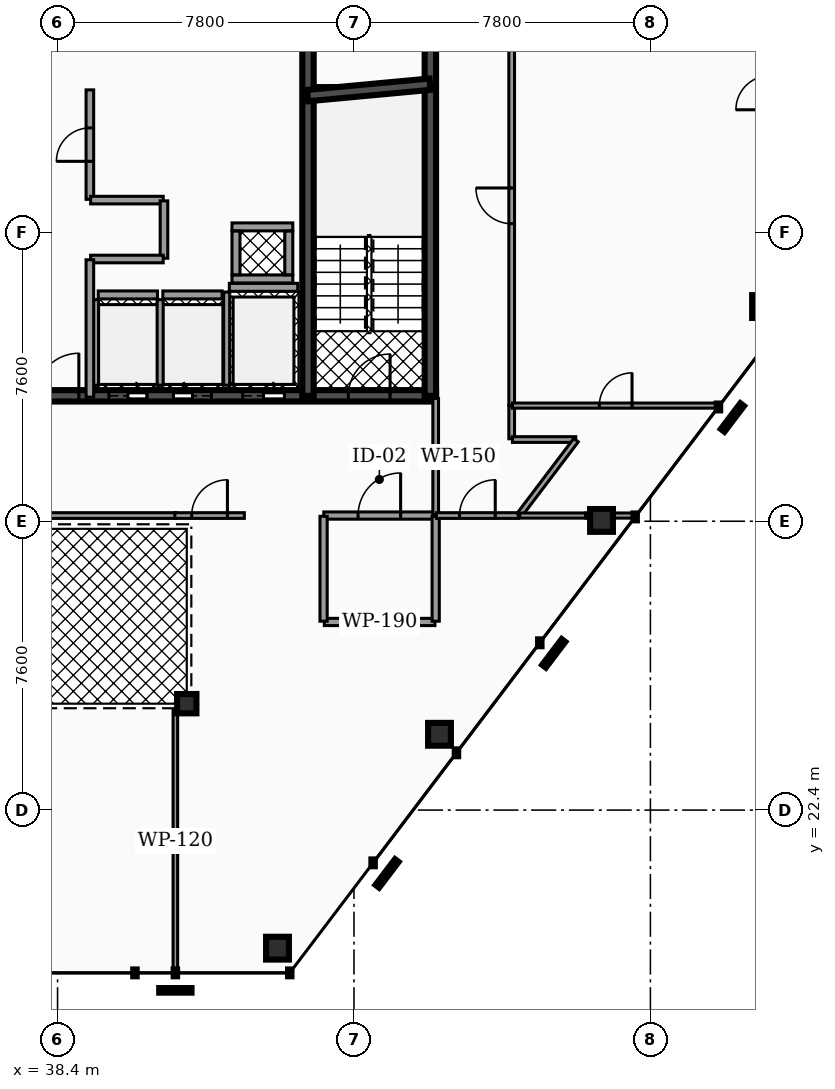
"""IFC4 building model, lengths in metres.
Left out: names, types, materials, properties, quantities, classifications, styles, units other than length and angle.
Written with IfcOpenShell. Run it as: python <this file> out.ifc"""

import sys

from ifc_helpers import new_model, si_unit, direction, frame, frame_2d, origin, origin_2d, place, context, subcontext, project, spatial, rectangle, hollow_rectangle, hollow_circle, extrude, element, fill, save


model = new_model("IFC4")
c1 = context("Model", 3, precision=1e-05, world=origin(), true_north=direction((0.0, 1.0)))
c2 = subcontext(c1, "Body", "Model", "MODEL_VIEW")
j1 = project(units=[si_unit("LENGTHUNIT", "METRE"), si_unit("PLANEANGLEUNIT", "RADIAN")], contexts=[c1])
p1 = place(None, origin())
s1 = spatial("IfcSite", under=j1, at=p1, CompositionType="ELEMENT")
p2 = place(p1, origin())
s2 = spatial("IfcBuilding", under=s1, at=p2, CompositionType="ELEMENT")
p3 = place(p2, frame((0.0, 0.0, 218.96)))
s3 = spatial("IfcBuildingStorey", under=s2, at=p3, CompositionType="ELEMENT", Elevation=218.96)
p4 = place(p3, frame((28.5, 33.3, 0.0), z_axis=(0.0, 0.0, 1.0), x_axis=(1.0, 0.0, 0.0)))
e1 = element("IfcWall", 1, at=p4, inside=s3, PredefinedType="SHEAR", context=c2, shape_type="SweptSolid", body=[
    extrude(rectangle(XDim=19.86, YDim=0.3, at=frame_2d((9.93, 0.0))), origin(), (0.0, 0.0, 1.0), 3.18),
])
p5 = place(p4, frame((3.93, 0.0, 0.0)))
e2 = element("IfcOpeningElement", 2, at=p5, cuts=e1, PredefinedType="OPENING", context=c2, shape_type="SweptSolid", body=[
    extrude(rectangle(XDim=1.1, YDim=2.15, at=frame_2d((0.55, 1.075))), frame((0.0, 0.16, 0.0), z_axis=(0.0, -1.0, 0.0), x_axis=(1.0, 0.0, 0.0)), (0.0, 0.0, 1.0), 0.32),
])
p6 = place(p4, frame((14.77, 0.0, 0.0)))
e3 = element("IfcOpeningElement", 3, at=p6, cuts=e1, PredefinedType="OPENING", context=c2, shape_type="SweptSolid", body=[
    extrude(rectangle(XDim=1.1, YDim=2.15, at=frame_2d((0.55, 1.075))), frame((0.0, 0.16, 0.0), z_axis=(0.0, -1.0, 0.0), x_axis=(1.0, 0.0, 0.0)), (0.0, 0.0, 1.0), 0.32),
])
p7 = place(p4, frame((11.25, 0.0, 0.0)))
e4 = element("IfcOpeningElement", 4, at=p7, cuts=e1, PredefinedType="OPENING", context=c2, shape_type="SweptSolid", body=[
    extrude(rectangle(XDim=1.0, YDim=2.1, at=frame_2d((0.5, 1.05))), frame((0.0, 0.16, 0.0), z_axis=(0.0, -1.0, 0.0), x_axis=(1.0, 0.0, 0.0)), (0.0, 0.0, 1.0), 0.32),
])
p8 = place(p4, frame((12.95, 0.0, 0.0)))
e5 = element("IfcOpeningElement", 5, at=p8, cuts=e1, PredefinedType="OPENING", context=c2, shape_type="SweptSolid", body=[
    extrude(rectangle(XDim=1.0, YDim=2.1, at=frame_2d((0.5, 1.05))), frame((0.0, 0.16, 0.0), z_axis=(0.0, -1.0, 0.0), x_axis=(1.0, 0.0, 0.0)), (0.0, 0.0, 1.0), 0.32),
])
p9 = place(p4, frame((5.85, 0.0, 0.0)))
e6 = element("IfcOpeningElement", 6, at=p9, cuts=e1, PredefinedType="OPENING", context=c2, shape_type="SweptSolid", body=[
    extrude(rectangle(XDim=1.0, YDim=2.1, at=frame_2d((0.5, 1.05))), frame((0.0, 0.16, 0.0), z_axis=(0.0, -1.0, 0.0), x_axis=(1.0, 0.0, 0.0)), (0.0, 0.0, 1.0), 0.32),
])
p10 = place(p4, frame((1.21, 0.0, 0.0)))
e7 = element("IfcOpeningElement", 7, at=p10, cuts=e1, PredefinedType="OPENING", context=c2, shape_type="SweptSolid", body=[
    extrude(rectangle(XDim=1.1, YDim=2.2, at=frame_2d((0.55, 1.1))), frame((0.0, 0.16, 0.0), z_axis=(0.0, -1.0, 0.0), x_axis=(1.0, 0.0, 0.0)), (0.0, 0.0, 1.0), 0.32),
])
p11 = place(p4, frame((9.34, 0.0, 0.0)))
e8 = element("IfcOpeningElement", 8, at=p11, cuts=e1, PredefinedType="OPENING", context=c2, shape_type="SweptSolid", body=[
    extrude(rectangle(XDim=1.12, YDim=2.05, at=frame_2d((0.56, 1.025))), frame((0.0, 0.16, 0.0), z_axis=(0.0, -1.0, 0.0), x_axis=(1.0, 0.0, 0.0)), (0.0, 0.0, 1.0), 0.32),
])
p12 = place(p4, frame((17.55, 0.0, 0.0)))
e9 = element("IfcOpeningElement", 9, at=p12, cuts=e1, PredefinedType="OPENING", context=c2, shape_type="SweptSolid", body=[
    extrude(rectangle(XDim=1.1, YDim=2.2, at=frame_2d((0.55, 1.1))), frame((0.0, 0.16, 0.0), z_axis=(0.0, -1.0, 0.0), x_axis=(1.0, 0.0, 0.0)), (0.0, 0.0, 1.0), 0.32),
])
for number, where, z_axis, x_axis in (
    (10, (44.99, 33.3, 0.0), (0.0, 0.0, 1.0), (0.0, 1.0, 0.0)),
    (11, (48.21, 33.3, 0.0), (0.0, 0.0, 1.0), (0.0, 1.0, 0.0)),
):
    element("IfcWall", number, at=place(p3, frame(where, z_axis=z_axis, x_axis=x_axis)), inside=s3, PredefinedType="SHEAR", context=c2, shape_type="SweptSolid", body=[
        extrude(rectangle(XDim=10.1, YDim=0.3, at=frame_2d((5.05, 0.0))), origin(), (0.0, 0.0, 1.0), 3.18),
    ])
p13 = place(p3, frame((44.98, 41.2, 0.0), z_axis=(0.0, 0.0, 1.0), x_axis=(0.995686468965, 0.09278176286, 0.0)))
e12 = element("IfcWall", 12, at=p13, inside=s3, PredefinedType="SHEAR", context=c2, shape_type="SweptSolid", body=[
    extrude(rectangle(XDim=3.234, YDim=0.3, at=frame_2d((1.617, 0.0))), origin(), (0.0, 0.0, 1.0), 3.18),
])
for number, where, z_axis, x_axis in (
    (13, (44.187, 18.767, 0.0), (0.0, 0.0, 1.0), (1.0, 0.0, 0.0)),
    (14, (48.45, 24.394, 0.0), (0.0, 0.0, 1.0), (1.0, 0.0, 0.0)),
    (15, (52.714, 30.022, 0.0), (0.0, 0.0, 1.0), (1.0, 0.0, 0.0)),
    (16, (56.977, 35.649, 0.0), (0.0, 0.0, 1.0), (1.0, 0.0, 0.0)),
):
    element("IfcColumn", number, at=place(p3, frame(where, z_axis=z_axis, x_axis=x_axis)), inside=s3, PredefinedType="COLUMN", context=c2, shape_type="SweptSolid", body=[
        extrude(hollow_rectangle(XDim=0.6, YDim=0.6, WallThickness=0.03, at=origin_2d()), origin(), (0.0, 0.0, 1.0), 3.18),
    ])
p14 = place(p3, frame((41.8, 25.2, 0.0), z_axis=(0.0, 0.0, 1.0), x_axis=(1.0, 0.0, 0.0)))
e17 = element("IfcColumn", 17, at=p14, inside=s3, PredefinedType="COLUMN", context=c2, shape_type="SweptSolid", body=[
    extrude(hollow_circle(Radius=0.254, WallThickness=0.02, at=origin_2d()), origin(), (0.0, 0.0, 1.0), 3.18),
])
p15 = place(p3, frame((42.92, 36.155, 0.0), z_axis=(0.0, 0.0, 1.0), x_axis=(1.0, 0.0, 0.0)))
e18 = element("IfcWall", 18, at=p15, inside=s3, PredefinedType="SOLIDWALL", context=c2, shape_type="SweptSolid", body=[
    extrude(rectangle(XDim=1.8, YDim=0.21, at=frame_2d((0.9, 0.0))), origin(), (0.0, 0.0, 1.0), 3.18),
])
p16 = place(p3, frame((42.85, 33.58, 0.0), z_axis=(0.0, 0.0, 1.0), x_axis=(0.0, 1.0, 0.0)))
e19 = element("IfcWall", 19, at=p16, inside=s3, PredefinedType="SOLIDWALL", context=c2, shape_type="SweptSolid", body=[
    extrude(rectangle(XDim=2.45, YDim=0.16, at=frame_2d((1.225, 0.0))), origin(), (0.0, 0.0, 1.0), 3.18),
])
p17 = place(p3, frame((39.47, 35.955, 0.0), z_axis=(0.0, 0.0, 1.0), x_axis=(1.0, 0.0, 0.0)))
e20 = element("IfcWall", 20, at=p17, inside=s3, PredefinedType="SOLIDWALL", context=c2, shape_type="SweptSolid", body=[
    extrude(rectangle(XDim=1.56, YDim=0.21, at=frame_2d((0.78, 0.0))), origin(), (0.0, 0.0, 1.0), 3.18),
])
for number, where, z_axis, x_axis in (
    (21, (39.4, 33.58, 0.0), (0.0, 0.0, 1.0), (0.0, 1.0, 0.0)),
    (22, (41.1, 33.58, 0.0), (0.0, 0.0, 1.0), (0.0, 1.0, 0.0)),
):
    element("IfcWall", number, at=place(p3, frame(where, z_axis=z_axis, x_axis=x_axis)), inside=s3, PredefinedType="SOLIDWALL", context=c2, shape_type="SweptSolid", body=[
        extrude(rectangle(XDim=2.25, YDim=0.16, at=frame_2d((1.125, 0.0))), origin(), (0.0, 0.0, 1.0), 3.18),
    ])
p18 = place(p3, frame((41.17, 35.955, 0.0), z_axis=(0.0, 0.0, 1.0), x_axis=(1.0, 0.0, 0.0)))
e23 = element("IfcWall", 23, at=p18, inside=s3, PredefinedType="SOLIDWALL", context=c2, shape_type="SweptSolid", body=[
    extrude(rectangle(XDim=1.56, YDim=0.21, at=frame_2d((0.78, 0.0))), origin(), (0.0, 0.0, 1.0), 3.18),
])
for number, where, z_axis, x_axis in (
    (24, (42.99, 36.375, 0.0), (0.0, 0.0, 1.0), (1.0, 0.0, 0.0)),
    (25, (42.99, 37.745, 0.0), (0.0, 0.0, 1.0), (1.0, 0.0, 0.0)),
):
    element("IfcWall", number, at=place(p3, frame(where, z_axis=z_axis, x_axis=x_axis)), inside=s3, PredefinedType="SOLIDWALL", context=c2, shape_type="SweptSolid", body=[
        extrude(rectangle(XDim=1.6, YDim=0.21, at=frame_2d((0.8, 0.0))), origin(), (0.0, 0.0, 1.0), 3.18),
    ])
for number, where, z_axis, x_axis in (
    (26, (43.095, 36.485, 0.0), (0.0, 0.0, 1.0), (0.0, 1.0, 0.0)),
    (27, (44.485, 36.485, 0.0), (0.0, 0.0, 1.0), (0.0, 1.0, 0.0)),
):
    element("IfcWall", number, at=place(p3, frame(where, z_axis=z_axis, x_axis=x_axis)), inside=s3, PredefinedType="SOLIDWALL", context=c2, shape_type="SweptSolid", body=[
        extrude(rectangle(XDim=1.15, YDim=0.21, at=frame_2d((0.575, 0.0))), origin(), (0.0, 0.0, 1.0), 3.18),
    ])
p19 = place(p3, frame((39.25, 38.47, 0.0), z_axis=(0.0, 0.0, 1.0), x_axis=(0.0, 1.0, 0.0)))
e28 = element("IfcWall", 28, at=p19, inside=s3, PredefinedType="PARTITIONING", context=c2, shape_type="SweptSolid", body=[
    extrude(rectangle(XDim=2.88, YDim=0.2, at=frame_2d((1.44, 0.0))), origin(), (0.0, 0.0, 1.0), 2.235),
])
p20 = place(p19, frame((1.0, 0.0, 0.0)))
e29 = element("IfcOpeningElement", 29, at=p20, cuts=e28, PredefinedType="OPENING", context=c2, shape_type="SweptSolid", body=[
    extrude(rectangle(XDim=0.88, YDim=2.05, at=frame_2d((0.44, 1.025))), frame((0.0, 0.11, 0.0), z_axis=(0.0, -1.0, 0.0), x_axis=(1.0, 0.0, 0.0)), (0.0, 0.0, 1.0), 0.22),
])
p21 = place(p3, frame((39.27, 38.45, 0.0), z_axis=(0.0, 0.0, 1.0), x_axis=(1.0, 0.0, 0.0)))
e30 = element("IfcWall", 30, at=p21, inside=s3, PredefinedType="PARTITIONING", context=c2, shape_type="SweptSolid", body=[
    extrude(rectangle(XDim=1.91, YDim=0.2, at=frame_2d((0.955, 0.0))), origin(), (0.0, 0.0, 1.0), 2.235),
])
p22 = place(p3, frame((41.2, 36.92, 0.0), z_axis=(0.0, 0.0, 1.0), x_axis=(0.0, 1.0, 0.0)))
e31 = element("IfcWall", 31, at=p22, inside=s3, PredefinedType="PARTITIONING", context=c2, shape_type="SweptSolid", body=[
    extrude(rectangle(XDim=1.51, YDim=0.2, at=frame_2d((0.755, 0.0))), origin(), (0.0, 0.0, 1.0), 2.235),
])
p23 = place(p3, frame((39.27, 36.9, 0.0), z_axis=(0.0, 0.0, 1.0), x_axis=(1.0, 0.0, 0.0)))
e32 = element("IfcWall", 32, at=p23, inside=s3, PredefinedType="PARTITIONING", context=c2, shape_type="SweptSolid", body=[
    extrude(rectangle(XDim=1.91, YDim=0.2, at=frame_2d((0.955, 0.0))), origin(), (0.0, 0.0, 1.0), 2.235),
])
p24 = place(p3, frame((39.25, 33.265, 0.0), z_axis=(0.0, 0.0, 1.0), x_axis=(0.0, 1.0, 0.0)))
e33 = element("IfcWall", 33, at=p24, inside=s3, PredefinedType="PARTITIONING", context=c2, shape_type="SweptSolid", body=[
    extrude(rectangle(XDim=3.615, YDim=0.2, at=frame_2d((1.808, 0.0))), origin(), (0.0, 0.0, 1.0), 2.235),
])
p25 = place(p3, frame((45.405, 30.15, 0.0), z_axis=(0.0, 0.0, 1.0), x_axis=(1.0, 0.0, 0.0)))
e34 = element("IfcWall", 34, at=p25, inside=s3, PredefinedType="PARTITIONING", context=c2, shape_type="SweptSolid", body=[
    extrude(rectangle(XDim=2.925, YDim=0.19, at=frame_2d((1.462, 0.0))), origin(), (0.0, 0.0, 1.0), 2.235),
])
p26 = place(p25, frame((0.903, 0.0, 0.0)))
e35 = element("IfcOpeningElement", 35, at=p26, cuts=e34, PredefinedType="OPENING", context=c2, shape_type="SweptSolid", body=[
    extrude(rectangle(XDim=1.12, YDim=2.05, at=frame_2d((0.56, 1.025))), frame((0.0, 0.105, 0.0), z_axis=(0.0, -1.0, 0.0), x_axis=(1.0, 0.0, 0.0)), (0.0, 0.0, 1.0), 0.21),
])
p27 = place(p3, frame((48.35, 30.17, 0.0), z_axis=(0.0, 0.0, 1.0), x_axis=(0.0, 1.0, 0.0)))
e36 = element("IfcWall", 36, at=p27, inside=s3, PredefinedType="PARTITIONING", context=c2, shape_type="SweptSolid", body=[
    extrude(rectangle(XDim=3.06, YDim=0.15, at=frame_2d((1.53, 0.0))), origin(), (0.0, 0.0, 1.0), 2.235),
])
p28 = place(p3, frame((33.485, 30.15, 0.0), z_axis=(0.0, 0.0, 1.0), x_axis=(1.0, 0.0, 0.0)))
e37 = element("IfcWall", 37, at=p28, inside=s3, PredefinedType="PARTITIONING", context=c2, shape_type="SweptSolid", body=[
    extrude(rectangle(XDim=8.03, YDim=0.15, at=frame_2d((4.015, 0.0))), origin(), (0.0, 0.0, 1.0), 2.235),
])
p29 = place(p28, frame((0.345, 0.0, 0.0)))
e38 = element("IfcOpeningElement", 38, at=p29, cuts=e37, PredefinedType="OPENING", context=c2, shape_type="SweptSolid", body=[
    extrude(rectangle(XDim=0.94, YDim=2.05, at=frame_2d((0.47, 1.025))), frame((0.0, 0.085, 0.0), z_axis=(0.0, -1.0, 0.0), x_axis=(1.0, 0.0, 0.0)), (0.0, 0.0, 1.0), 0.17),
])
p30 = place(p3, frame((41.485, 30.15, 0.0), z_axis=(0.0, 0.0, 1.0), x_axis=(1.0, 0.0, 0.0)))
e39 = element("IfcWall", 39, at=p30, inside=s3, PredefinedType="PARTITIONING", context=c2, shape_type="SweptSolid", body=[
    extrude(rectangle(XDim=1.83, YDim=0.15, at=frame_2d((0.915, 0.0))), origin(), (0.0, 0.0, 1.0), 2.235),
])
p31 = place(p30, frame((0.445, 0.0, 0.0)))
e40 = element("IfcOpeningElement", 40, at=p31, cuts=e39, PredefinedType="OPENING", context=c2, shape_type="SweptSolid", body=[
    extrude(rectangle(XDim=0.94, YDim=2.05, at=frame_2d((0.47, 1.025))), frame((0.0, 0.085, 0.0), z_axis=(0.0, -1.0, 0.0), x_axis=(1.0, 0.0, 0.0)), (0.0, 0.0, 1.0), 0.17),
])
p32 = place(p3, frame((45.42, 27.35, 0.0), z_axis=(0.0, 0.0, 1.0), x_axis=(1.0, 0.0, 0.0)))
e41 = element("IfcWall", 41, at=p32, inside=s3, PredefinedType="PARTITIONING", context=c2, shape_type="SweptSolid", body=[
    extrude(rectangle(XDim=2.91, YDim=0.19, at=frame_2d((1.455, 0.0))), origin(), (0.0, 0.0, 1.0), 2.235),
])
for number, where, z_axis, x_axis in (
    (42, (45.4, 27.37, 0.0), (0.0, 0.0, 1.0), (0.0, 1.0, 0.0)),
    (43, (48.35, 27.37, 0.0), (0.0, 0.0, 1.0), (0.0, 1.0, 0.0)),
):
    element("IfcWall", number, at=place(p3, frame(where, z_axis=z_axis, x_axis=x_axis)), inside=s3, PredefinedType="PARTITIONING", context=c2, shape_type="SweptSolid", body=[
        extrude(rectangle(XDim=2.76, YDim=0.19, at=frame_2d((1.38, 0.0))), origin(), (0.0, 0.0, 1.0), 2.235),
    ])
p33 = place(p3, frame((48.37, 30.15, 0.0), z_axis=(0.0, 0.0, 1.0), x_axis=(1.0, 0.0, 0.0)))
e44 = element("IfcWall", 44, at=p33, inside=s3, PredefinedType="PARTITIONING", context=c2, shape_type="SweptSolid", body=[
    extrude(rectangle(XDim=2.155, YDim=0.15, at=frame_2d((1.078, 0.0))), origin(), (0.0, 0.0, 1.0), 2.235),
])
p34 = place(p33, frame((0.608, 0.0, 0.0)))
e45 = element("IfcOpeningElement", 45, at=p34, cuts=e44, PredefinedType="OPENING", context=c2, shape_type="SweptSolid", body=[
    extrude(rectangle(XDim=0.94, YDim=2.05, at=frame_2d((0.47, 1.025))), frame((0.0, 0.085, 0.0), z_axis=(0.0, -1.0, 0.0), x_axis=(1.0, 0.0, 0.0)), (0.0, 0.0, 1.0), 0.17),
])
p35 = place(p3, frame((50.35, 33.049, 0.0), z_axis=(0.0, 0.0, 1.0), x_axis=(0.0, 1.0, 0.0)))
e46 = element("IfcWall", 46, at=p35, inside=s3, PredefinedType="PARTITIONING", context=c2, shape_type="SweptSolid", body=[
    extrude(rectangle(XDim=10.501, YDim=0.15, at=frame_2d((5.251, 0.0))), origin(), (0.0, 0.0, 1.0), 2.235),
])
p36 = place(p35, frame((4.781, 0.0, 0.0)))
e47 = element("IfcOpeningElement", 47, at=p36, cuts=e46, PredefinedType="OPENING", context=c2, shape_type="SweptSolid", body=[
    extrude(rectangle(XDim=0.94, YDim=2.05, at=frame_2d((0.47, 1.025))), frame((0.0, 0.085, 0.0), z_axis=(0.0, -1.0, 0.0), x_axis=(1.0, 0.0, 0.0)), (0.0, 0.0, 1.0), 0.17),
])
p37 = place(p3, frame((50.35, 32.17, 0.0), z_axis=(0.0, 0.0, 1.0), x_axis=(0.0, 1.0, 0.0)))
e48 = element("IfcWall", 48, at=p37, inside=s3, PredefinedType="PARTITIONING", context=c2, shape_type="SweptSolid", body=[
    extrude(rectangle(XDim=0.869, YDim=0.15, at=frame_2d((0.434, 0.0))), origin(), (0.0, 0.0, 1.0), 2.235),
])
p38 = place(p3, frame((50.37, 32.15, 0.0), z_axis=(0.0, 0.0, 1.0), x_axis=(1.0, 0.0, 0.0)))
e49 = element("IfcWall", 49, at=p38, inside=s3, PredefinedType="PARTITIONING", context=c2, shape_type="SweptSolid", body=[
    extrude(rectangle(XDim=1.665, YDim=0.15, at=frame_2d((0.833, 0.0))), origin(), (0.0, 0.0, 1.0), 2.235),
])
p39 = place(p3, frame((50.552, 30.166, 0.0), z_axis=(0.0, 0.0, 1.0), x_axis=(0.603869110647, 0.797083494502, 0.0)))
e50 = element("IfcWall", 50, at=p39, inside=s3, PredefinedType="PARTITIONING", context=c2, shape_type="SweptSolid", body=[
    extrude(rectangle(XDim=2.469, YDim=0.15, at=frame_2d((1.234, 0.0))), origin(), (0.0, 0.0, 1.0), 2.235),
])
p40 = place(p3, frame((41.5, 18.132, 0.0), z_axis=(0.0, 0.0, 1.0), x_axis=(0.0, 1.0, 0.0)))
e51 = element("IfcWall", 51, at=p40, inside=s3, PredefinedType="PARTITIONING", context=c2, shape_type="SweptSolid", body=[
    extrude(rectangle(XDim=6.888, YDim=0.12, at=frame_2d((3.444, 0.0))), origin(), (0.0, 0.0, 1.0), 2.235),
])
p41 = place(p3, frame((50.56, 30.15, 0.0), z_axis=(0.0, 0.0, 1.0), x_axis=(1.0, 0.0, 0.0)))
e52 = element("IfcWall", 52, at=p41, inside=s3, PredefinedType="PARTITIONING", context=c2, shape_type="SweptSolid", body=[
    extrude(rectangle(XDim=1.74, YDim=0.135, at=frame_2d((0.87, 0.0))), origin(), (0.0, 0.0, 1.0), 2.235),
])
p42 = place(p3, frame((52.3, 30.15, 0.0), z_axis=(0.0, 0.0, 1.0), x_axis=(1.0, 0.0, 0.0)))
e53 = element("IfcWall", 53, at=p42, inside=s3, PredefinedType="PARTITIONING", context=c2, shape_type="SweptSolid", body=[
    extrude(rectangle(XDim=1.311, YDim=0.135, at=frame_2d((0.656, 0.0))), origin(), (0.0, 0.0, 1.0), 2.235),
])
p43 = place(p3, frame((50.37, 33.043, 0.0), z_axis=(0.0, 0.0, 1.0), x_axis=(1.0, 0.0, 0.0)))
e54 = element("IfcWall", 54, at=p43, inside=s3, PredefinedType="PARTITIONING", context=c2, shape_type="SweptSolid", body=[
    extrude(rectangle(XDim=5.433, YDim=0.135, at=frame_2d((2.717, 0.0))), origin(), (0.0, 0.0, 1.0), 2.235),
])
p44 = place(p43, frame((2.287, 0.0, 0.0)))
e55 = element("IfcOpeningElement", 55, at=p44, cuts=e54, PredefinedType="OPENING", context=c2, shape_type="SweptSolid", body=[
    extrude(rectangle(XDim=0.86, YDim=2.05, at=frame_2d((0.43, 1.025))), frame((0.0, 0.077, 0.0), z_axis=(0.0, -1.0, 0.0), x_axis=(1.0, 0.0, 0.0)), (0.0, 0.0, 1.0), 0.155),
])
p45 = place(p6, origin())
e56 = element("IfcDoor", 56, at=p45, inside=s3, OperationType="SLIDING_TO_RIGHT", PredefinedType="DOOR", context=c2, shape_type="SweptSolid", body=[
    extrude(rectangle(XDim=1.1, YDim=2.15, at=frame_2d((0.55, 1.075))), frame((0.0, 0.025, 0.0), z_axis=(0.0, -1.0, 0.0), x_axis=(1.0, 0.0, 0.0)), (0.0, 0.0, 1.0), 0.05),
])
fill(e3, e56)
p46 = place(p7, origin())
e57 = element("IfcDoor", 57, at=p46, inside=s3, OperationType="SLIDING_TO_RIGHT", PredefinedType="DOOR", context=c2, shape_type="SweptSolid", body=[
    extrude(rectangle(XDim=1.0, YDim=2.1, at=frame_2d((0.5, 1.05))), frame((0.0, 0.025, 0.0), z_axis=(0.0, -1.0, 0.0), x_axis=(1.0, 0.0, 0.0)), (0.0, 0.0, 1.0), 0.05),
])
fill(e4, e57)
p47 = place(p8, origin())
e58 = element("IfcDoor", 58, at=p47, inside=s3, OperationType="SLIDING_TO_LEFT", PredefinedType="DOOR", context=c2, shape_type="SweptSolid", body=[
    extrude(rectangle(XDim=1.0, YDim=2.1, at=frame_2d((0.5, 1.05))), frame((0.0, 0.025, 0.0), z_axis=(0.0, -1.0, 0.0), x_axis=(1.0, 0.0, 0.0)), (0.0, 0.0, 1.0), 0.05),
])
fill(e5, e58)
p48 = place(p11, origin())
e59 = element("IfcDoor", 59, at=p48, inside=s3, OperationType="SINGLE_SWING_RIGHT", PredefinedType="DOOR", context=c2, shape_type="SweptSolid", body=[
    extrude(rectangle(XDim=1.12, YDim=2.05, at=frame_2d((0.56, 1.025))), frame((0.0, 0.025, 0.0), z_axis=(0.0, -1.0, 0.0), x_axis=(1.0, 0.0, 0.0)), (0.0, 0.0, 1.0), 0.05),
])
fill(e8, e59)
p49 = place(p12, origin())
e60 = element("IfcDoor", 60, at=p49, inside=s3, OperationType="SINGLE_SWING_RIGHT", PredefinedType="DOOR", context=c2, shape_type="SweptSolid", body=[
    extrude(rectangle(XDim=1.1, YDim=2.2, at=frame_2d((0.55, 1.1))), frame((0.0, 0.025, 0.0), z_axis=(0.0, -1.0, 0.0), x_axis=(1.0, 0.0, 0.0)), (0.0, 0.0, 1.0), 0.05),
])
fill(e9, e60)
p50 = place(p20, origin())
e61 = element("IfcDoor", 61, at=p50, inside=s3, OperationType="SINGLE_SWING_LEFT", PredefinedType="DOOR", context=c2, shape_type="SweptSolid", body=[
    extrude(rectangle(XDim=0.88, YDim=2.05, at=frame_2d((0.44, 1.025))), frame((0.0, 0.025, 0.0), z_axis=(0.0, -1.0, 0.0), x_axis=(1.0, 0.0, 0.0)), (0.0, 0.0, 1.0), 0.05),
])
fill(e29, e61)
p51 = place(p26, origin())
e62 = element("IfcDoor", 62, at=p51, inside=s3, OperationType="SINGLE_SWING_RIGHT", PredefinedType="DOOR", context=c2, shape_type="SweptSolid", body=[
    extrude(rectangle(XDim=1.12, YDim=2.05, at=frame_2d((0.56, 1.025))), frame((0.0, 0.025, 0.0), z_axis=(0.0, -1.0, 0.0), x_axis=(1.0, 0.0, 0.0)), (0.0, 0.0, 1.0), 0.05),
])
fill(e35, e62)
p52 = place(p31, origin())
e63 = element("IfcDoor", 63, at=p52, inside=s3, OperationType="SINGLE_SWING_RIGHT", PredefinedType="DOOR", context=c2, shape_type="SweptSolid", body=[
    extrude(rectangle(XDim=0.94, YDim=2.05, at=frame_2d((0.47, 1.025))), frame((0.0, 0.025, 0.0), z_axis=(0.0, -1.0, 0.0), x_axis=(1.0, 0.0, 0.0)), (0.0, 0.0, 1.0), 0.05),
])
fill(e40, e63)
p53 = place(p34, origin())
e64 = element("IfcDoor", 64, at=p53, inside=s3, OperationType="SINGLE_SWING_RIGHT", PredefinedType="DOOR", context=c2, shape_type="SweptSolid", body=[
    extrude(rectangle(XDim=0.94, YDim=2.05, at=frame_2d((0.47, 1.025))), frame((0.0, 0.025, 0.0), z_axis=(0.0, -1.0, 0.0), x_axis=(1.0, 0.0, 0.0)), (0.0, 0.0, 1.0), 0.05),
])
fill(e45, e64)
p54 = place(p36, origin())
e65 = element("IfcDoor", 65, at=p54, inside=s3, OperationType="SINGLE_SWING_RIGHT", PredefinedType="DOOR", context=c2, shape_type="SweptSolid", body=[
    extrude(rectangle(XDim=0.94, YDim=2.05, at=frame_2d((0.47, 1.025))), frame((0.0, 0.025, 0.0), z_axis=(0.0, -1.0, 0.0), x_axis=(1.0, 0.0, 0.0)), (0.0, 0.0, 1.0), 0.05),
])
fill(e47, e65)
p55 = place(p44, origin())
e66 = element("IfcDoor", 66, at=p55, inside=s3, OperationType="SINGLE_SWING_RIGHT", PredefinedType="DOOR", context=c2, shape_type="SweptSolid", body=[
    extrude(rectangle(XDim=0.86, YDim=2.05, at=frame_2d((0.43, 1.025))), frame((0.0, 0.025, 0.0), z_axis=(0.0, -1.0, 0.0), x_axis=(1.0, 0.0, 0.0)), (0.0, 0.0, 1.0), 0.05),
])
fill(e55, e66)
save(model, sys.argv[1])
